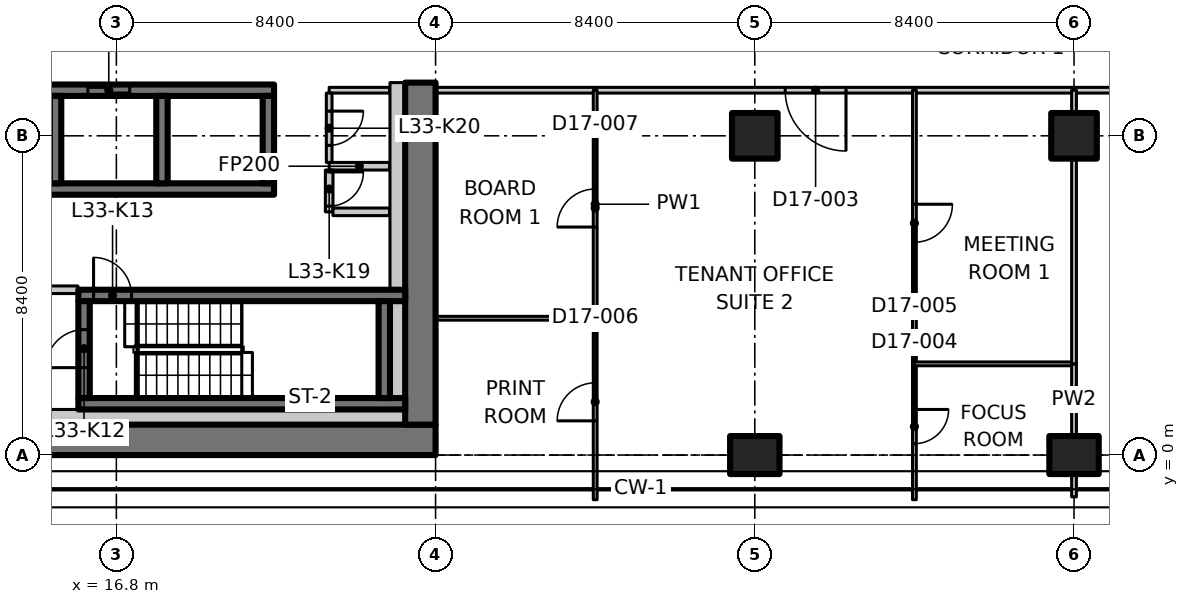
"""IFC4 building model, lengths in metres.
Left out: names, types, materials, properties, quantities, classifications, styles, units other than length and angle.
Written with IfcOpenShell. Run it as: python <this file> out.ifc"""

import sys

from ifc_helpers import new_model, si_unit, direction, frame, frame_2d, origin, origin_2d, place, context, subcontext, project, spatial, polyline, rectangle, outline, extrude, element, fill, save


model = new_model("IFC4")
c1 = context("Model", 3, precision=1e-05, world=origin(), true_north=direction((0.0, 1.0)))
c2 = subcontext(c1, "Body", "Model", "MODEL_VIEW")
j1 = project(units=[si_unit("LENGTHUNIT", "METRE"), si_unit("PLANEANGLEUNIT", "RADIAN")], contexts=[c1])
p1 = place(None, origin())
s1 = spatial("IfcSite", under=j1, at=p1, CompositionType="ELEMENT")
p2 = place(p1, origin())
s2 = spatial("IfcBuilding", under=s1, at=p2, CompositionType="ELEMENT")
p3 = place(p2, frame((0.0, 0.0, 134.9)))
s3 = spatial("IfcBuildingStorey", under=s2, at=p3, CompositionType="ELEMENT", Elevation=134.9)
p4 = place(p3, frame((33.6, 0.0, 0.0), z_axis=(0.0, 0.0, 1.0), x_axis=(0.0, 1.0, 0.0)))
e1 = element("IfcColumn", 1, at=p4, inside=s3, PredefinedType="COLUMN", context=c2, shape_type="SweptSolid", body=[
    extrude(rectangle(XDim=1.0, YDim=1.3, at=origin_2d()), origin(), (0.0, 0.0, 1.0), 3.35),
])
p5 = place(p3, frame((33.6, 8.4, 0.0), z_axis=(0.0, 0.0, 1.0), x_axis=(1.0, 0.0, 0.0)))
e2 = element("IfcColumn", 2, at=p5, inside=s3, PredefinedType="COLUMN", context=c2, shape_type="SweptSolid", body=[
    extrude(rectangle(XDim=1.2, YDim=1.2, at=origin_2d()), origin(), (0.0, 0.0, 1.0), 3.35),
])
p6 = place(p3, frame((42.0, 0.0, 0.0), z_axis=(0.0, 0.0, 1.0), x_axis=(0.0, 1.0, 0.0)))
e3 = element("IfcColumn", 3, at=p6, inside=s3, PredefinedType="COLUMN", context=c2, shape_type="SweptSolid", body=[
    extrude(rectangle(XDim=1.0, YDim=1.3, at=origin_2d()), origin(), (0.0, 0.0, 1.0), 3.35),
])
p7 = place(p3, frame((42.0, 8.4, 0.0), z_axis=(0.0, 0.0, 1.0), x_axis=(1.0, 0.0, 0.0)))
e4 = element("IfcColumn", 4, at=p7, inside=s3, PredefinedType="COLUMN", context=c2, shape_type="SweptSolid", body=[
    extrude(rectangle(XDim=1.2, YDim=1.2, at=origin_2d()), origin(), (0.0, 0.0, 1.0), 3.35),
])
p8 = place(p3, frame((7.136, 0.4, 0.0), z_axis=(0.0, 0.0, 1.0), x_axis=(1.0, 0.0, 0.0)))
e5 = element("IfcWall", 5, at=p8, inside=s3, PredefinedType="SHEAR", context=c2, shape_type="SweptSolid", body=[
    extrude(rectangle(XDim=18.063, YDim=0.8, at=frame_2d((9.032, 0.0))), origin(), (0.0, 0.0, 1.0), 3.35),
])
p9 = place(p3, frame((24.8, 0.8, 0.0), z_axis=(0.0, 0.0, 1.0), x_axis=(0.0, 1.0, 0.0)))
e6 = element("IfcWall", 6, at=p9, inside=s3, PredefinedType="SHEAR", context=c2, shape_type="SweptSolid", body=[
    extrude(rectangle(XDim=9.0, YDim=0.8, at=frame_2d((4.5, 0.0))), origin(), (0.0, 0.0, 1.0), 3.35),
])
p10 = place(p3, frame((0.8, 7.0, 0.0), z_axis=(0.0, 0.0, 1.0), x_axis=(1.0, 0.0, 0.0)))
e7 = element("IfcWall", 7, at=p10, inside=s3, PredefinedType="SHEAR", context=c2, shape_type="SweptSolid", body=[
    extrude(rectangle(XDim=20.15, YDim=0.3, at=frame_2d((10.075, 0.0))), origin(), (0.0, 0.0, 1.0), 3.35),
])
p11 = place(p3, frame((0.8, 9.6, 0.0), z_axis=(0.0, 0.0, 1.0), x_axis=(1.0, 0.0, 0.0)))
e8 = element("IfcWall", 8, at=p11, inside=s3, PredefinedType="SHEAR", context=c2, shape_type="SweptSolid", body=[
    extrude(rectangle(XDim=20.15, YDim=0.3, at=frame_2d((10.075, 0.0))), origin(), (0.0, 0.0, 1.0), 3.35),
])
p12 = place(p11, frame((1.25, 0.0, 0.0)))
e9 = element("IfcOpeningElement", 9, at=p12, cuts=e8, PredefinedType="OPENING", context=c2, shape_type="SweptSolid", body=[
    extrude(rectangle(XDim=1.1, YDim=2.3, at=frame_2d((0.55, 1.15))), frame((0.0, 0.16, 0.0), z_axis=(0.0, -1.0, 0.0), x_axis=(1.0, 0.0, 0.0)), (0.0, 0.0, 1.0), 0.32),
])
p13 = place(p11, frame((4.05, 0.0, 0.0)))
e10 = element("IfcOpeningElement", 10, at=p13, cuts=e8, PredefinedType="OPENING", context=c2, shape_type="SweptSolid", body=[
    extrude(rectangle(XDim=1.1, YDim=2.3, at=frame_2d((0.55, 1.15))), frame((0.0, 0.16, 0.0), z_axis=(0.0, -1.0, 0.0), x_axis=(1.0, 0.0, 0.0)), (0.0, 0.0, 1.0), 0.32),
])
p14 = place(p11, frame((6.85, 0.0, 0.0)))
e11 = element("IfcOpeningElement", 11, at=p14, cuts=e8, PredefinedType="OPENING", context=c2, shape_type="SweptSolid", body=[
    extrude(rectangle(XDim=1.1, YDim=2.3, at=frame_2d((0.55, 1.15))), frame((0.0, 0.16, 0.0), z_axis=(0.0, -1.0, 0.0), x_axis=(1.0, 0.0, 0.0)), (0.0, 0.0, 1.0), 0.32),
])
p15 = place(p11, frame((9.65, 0.0, 0.0)))
e12 = element("IfcOpeningElement", 12, at=p15, cuts=e8, PredefinedType="OPENING", context=c2, shape_type="SweptSolid", body=[
    extrude(rectangle(XDim=1.1, YDim=2.3, at=frame_2d((0.55, 1.15))), frame((0.0, 0.16, 0.0), z_axis=(0.0, -1.0, 0.0), x_axis=(1.0, 0.0, 0.0)), (0.0, 0.0, 1.0), 0.32),
])
p16 = place(p11, frame((12.45, 0.0, 0.0)))
e13 = element("IfcOpeningElement", 13, at=p16, cuts=e8, PredefinedType="OPENING", context=c2, shape_type="SweptSolid", body=[
    extrude(rectangle(XDim=1.1, YDim=2.3, at=frame_2d((0.55, 1.15))), frame((0.0, 0.16, 0.0), z_axis=(0.0, -1.0, 0.0), x_axis=(1.0, 0.0, 0.0)), (0.0, 0.0, 1.0), 0.32),
])
p17 = place(p11, frame((15.25, 0.0, 0.0)))
e14 = element("IfcOpeningElement", 14, at=p17, cuts=e8, PredefinedType="OPENING", context=c2, shape_type="SweptSolid", body=[
    extrude(rectangle(XDim=1.1, YDim=2.3, at=frame_2d((0.55, 1.15))), frame((0.0, 0.16, 0.0), z_axis=(0.0, -1.0, 0.0), x_axis=(1.0, 0.0, 0.0)), (0.0, 0.0, 1.0), 0.32),
])
for number, where, z_axis, x_axis in (
    (15, (15.2, 7.15, 0.0), (0.0, 0.0, 1.0), (0.0, 1.0, 0.0)),
    (16, (18.0, 7.15, 0.0), (0.0, 0.0, 1.0), (0.0, 1.0, 0.0)),
    (17, (20.8, 7.15, 0.0), (0.0, 0.0, 1.0), (0.0, 1.0, 0.0)),
):
    element("IfcWall", number, at=place(p3, frame(where, z_axis=z_axis, x_axis=x_axis)), inside=s3, PredefinedType="SHEAR", context=c2, shape_type="SweptSolid", body=[
        extrude(rectangle(XDim=2.3, YDim=0.3, at=frame_2d((1.15, 0.0))), origin(), (0.0, 0.0, 1.0), 3.35),
    ])
p18 = place(p3, frame((15.8, 1.35, 0.0), z_axis=(0.0, 0.0, 1.0), x_axis=(1.0, 0.0, 0.0)))
e18 = element("IfcWall", 18, at=p18, inside=s3, PredefinedType="SHEAR", context=c2, shape_type="SweptSolid", body=[
    extrude(rectangle(XDim=8.6, YDim=0.3, at=frame_2d((4.3, 0.0))), origin(), (0.0, 0.0, 1.0), 3.35),
])
p19 = place(p3, frame((15.8, 4.2, 0.0), z_axis=(0.0, 0.0, 1.0), x_axis=(1.0, 0.0, 0.0)))
e19 = element("IfcWall", 19, at=p19, inside=s3, PredefinedType="SHEAR", context=c2, shape_type="SweptSolid", body=[
    extrude(rectangle(XDim=8.6, YDim=0.3, at=frame_2d((4.3, 0.0))), origin(), (0.0, 0.0, 1.0), 3.35),
])
p20 = place(p19, frame((0.4, 0.0, 0.0)))
e20 = element("IfcOpeningElement", 20, at=p20, cuts=e19, PredefinedType="OPENING", context=c2, shape_type="SweptSolid", body=[
    extrude(rectangle(XDim=1.0, YDim=2.1, at=frame_2d((0.5, 1.05))), frame((0.0, 0.16, 0.0), z_axis=(0.0, -1.0, 0.0), x_axis=(1.0, 0.0, 0.0)), (0.0, 0.0, 1.0), 0.32),
])
p21 = place(p3, frame((15.95, 1.5, 0.0), z_axis=(0.0, 0.0, 1.0), x_axis=(0.0, 1.0, 0.0)))
e21 = element("IfcWall", 21, at=p21, inside=s3, PredefinedType="SHEAR", context=c2, shape_type="SweptSolid", body=[
    extrude(rectangle(XDim=2.55, YDim=0.3, at=frame_2d((1.275, 0.0))), origin(), (0.0, 0.0, 1.0), 3.35),
])
p22 = place(p21, frame((0.8, 0.0, 0.0)))
e22 = element("IfcOpeningElement", 22, at=p22, cuts=e21, PredefinedType="OPENING", context=c2, shape_type="SweptSolid", body=[
    extrude(rectangle(XDim=1.0, YDim=2.1, at=frame_2d((0.5, 1.05))), frame((0.0, 0.16, 0.0), z_axis=(0.0, -1.0, 0.0), x_axis=(1.0, 0.0, 0.0)), (0.0, 0.0, 1.0), 0.32),
])
p23 = place(p3, frame((23.85, 1.5, 0.0), z_axis=(0.0, 0.0, 1.0), x_axis=(0.0, 1.0, 0.0)))
e23 = element("IfcWall", 23, at=p23, inside=s3, PredefinedType="SHEAR", context=c2, shape_type="SweptSolid", body=[
    extrude(rectangle(XDim=2.55, YDim=0.3, at=frame_2d((1.275, 0.0))), origin(), (0.0, 0.0, 1.0), 3.35),
])
p24 = place(p3, frame((13.362, 4.35, 0.0), z_axis=(0.0, 0.0, 1.0), x_axis=(1.0, 0.0, 0.0)))
e24 = element("IfcWall", 24, at=p24, inside=s3, PredefinedType="PARTITIONING", context=c2, shape_type="SweptSolid", body=[
    extrude(rectangle(XDim=2.426, YDim=0.2, at=frame_2d((1.213, 0.0))), origin(), (0.0, 0.0, 1.0), 3.35),
])
p25 = place(p24, frame((0.638, 0.0, 0.0)))
e25 = element("IfcOpeningElement", 25, at=p25, cuts=e24, PredefinedType="OPENING", context=c2, shape_type="SweptSolid", body=[
    extrude(rectangle(XDim=1.0, YDim=2.1, at=frame_2d((0.5, 1.05))), frame((0.0, 0.11, 0.0), z_axis=(0.0, -1.0, 0.0), x_axis=(1.0, 0.0, 0.0)), (0.0, 0.0, 1.0), 0.22),
])
p26 = place(p3, frame((23.988, 7.6, 0.0), z_axis=(0.0, 0.0, 1.0), x_axis=(-1.0, 0.0, 0.0)))
e26 = element("IfcWall", 26, at=p26, inside=s3, PredefinedType="PARTITIONING", context=c2, shape_type="SweptSolid", body=[
    extrude(rectangle(XDim=1.588, YDim=0.2, at=frame_2d((0.794, 0.0))), origin(), (0.0, 0.0, 1.0), 3.35),
])
p27 = place(p3, frame((22.4, 7.5, 0.0), z_axis=(0.0, 0.0, 1.0), x_axis=(0.0, -1.0, 0.0)))
e27 = element("IfcWall", 27, at=p27, inside=s3, PredefinedType="PARTITIONING", context=c2, shape_type="SweptSolid", body=[
    extrude(rectangle(XDim=1.1, YDim=0.2, at=frame_2d((0.55, 0.0))), origin(), (0.0, 0.0, 1.0), 3.35),
])
p28 = place(p27, frame((0.05, 0.0, 0.0)))
e28 = element("IfcOpeningElement", 28, at=p28, cuts=e27, PredefinedType="OPENING", context=c2, shape_type="SweptSolid", body=[
    extrude(rectangle(XDim=0.9, YDim=2.1, at=frame_2d((0.45, 1.05))), frame((0.0, 0.11, 0.0), z_axis=(0.0, -1.0, 0.0), x_axis=(1.0, 0.0, 0.0)), (0.0, 0.0, 1.0), 0.22),
])
p29 = place(p3, frame((22.5, 6.4, 0.0), z_axis=(0.0, 0.0, 1.0), x_axis=(1.0, 0.0, 0.0)))
e29 = element("IfcWall", 29, at=p29, inside=s3, PredefinedType="PARTITIONING", context=c2, shape_type="SweptSolid", body=[
    extrude(rectangle(XDim=1.488, YDim=0.2, at=frame_2d((0.744, 0.0))), origin(), (0.0, 0.0, 1.0), 3.35),
])
p30 = place(p3, frame((23.988, 9.6, 0.0), z_axis=(0.0, 0.0, 1.0), x_axis=(-1.0, 0.0, 0.0)))
e30 = element("IfcWall", 30, at=p30, inside=s3, PredefinedType="PARTITIONING", context=c2, shape_type="SweptSolid", body=[
    extrude(rectangle(XDim=1.588, YDim=0.15, at=frame_2d((0.794, 0.0))), origin(), (0.0, 0.0, 1.0), 3.35),
])
p31 = place(p3, frame((22.4, 9.525, 0.0), z_axis=(0.0, 0.0, 1.0), x_axis=(0.0, -1.0, 0.0)))
e31 = element("IfcWall", 31, at=p31, inside=s3, PredefinedType="PARTITIONING", context=c2, shape_type="SweptSolid", body=[
    extrude(rectangle(XDim=1.825, YDim=0.15, at=frame_2d((0.913, 0.0))), origin(), (0.0, 0.0, 1.0), 3.35),
])
p32 = place(p31, frame((0.475, 0.0, 0.0)))
e32 = element("IfcOpeningElement", 32, at=p32, cuts=e31, PredefinedType="OPENING", context=c2, shape_type="SweptSolid", body=[
    extrude(rectangle(XDim=0.9, YDim=2.1, at=frame_2d((0.45, 1.05))), frame((0.0, 0.085, 0.0), z_axis=(0.0, -1.0, 0.0), x_axis=(1.0, 0.0, 0.0)), (0.0, 0.0, 1.0), 0.17),
])
p33 = place(p3, frame((13.35, 1.0, 0.0), z_axis=(0.0, 0.0, 1.0), x_axis=(1.0, 0.0, 0.0)))
e33 = element("IfcWall", 33, at=p33, inside=s3, PredefinedType="PARTITIONING", context=c2, shape_type="SweptSolid", body=[
    extrude(rectangle(XDim=11.05, YDim=0.4, at=frame_2d((5.525, 0.0))), origin(), (0.0, 0.0, 1.0), 3.35),
])
p34 = place(p3, frame((24.2, 1.5, 0.0), z_axis=(0.0, 0.0, 1.0), x_axis=(0.0, 1.0, 0.0)))
e34 = element("IfcWall", 34, at=p34, inside=s3, PredefinedType="PARTITIONING", context=c2, shape_type="SweptSolid", body=[
    extrude(rectangle(XDim=2.55, YDim=0.4, at=frame_2d((1.275, 0.0))), origin(), (0.0, 0.0, 1.0), 3.35),
])
p35 = place(p3, frame((24.2, 4.35, 0.0), z_axis=(0.0, 0.0, 1.0), x_axis=(0.0, 1.0, 0.0)))
e35 = element("IfcWall", 35, at=p35, inside=s3, PredefinedType="PARTITIONING", context=c2, shape_type="SweptSolid", body=[
    extrude(rectangle(XDim=5.45, YDim=0.4, at=frame_2d((2.725, 0.0))), origin(), (0.0, 0.0, 1.0), 3.35),
])
p36 = place(p3, frame((29.4, 9.6, 0.0), z_axis=(0.0, 0.0, 1.0), x_axis=(-1.0, 0.0, 0.0)))
e36 = element("IfcWall", 36, at=p36, inside=s3, PredefinedType="PARTITIONING", context=c2, shape_type="SweptSolid", body=[
    extrude(rectangle(XDim=4.2, YDim=0.15, at=frame_2d((2.1, 0.0))), origin(), (0.0, 0.0, 1.0), 3.33),
])
p37 = place(p3, frame((37.8, 9.6, 0.0), z_axis=(0.0, 0.0, 1.0), x_axis=(-1.0, 0.0, 0.0)))
e37 = element("IfcWall", 37, at=p37, inside=s3, PredefinedType="PARTITIONING", context=c2, shape_type="SweptSolid", body=[
    extrude(rectangle(XDim=8.4, YDim=0.15, at=frame_2d((4.2, 0.0))), origin(), (0.0, 0.0, 1.0), 3.33),
])
p38 = place(p37, frame((1.8, 0.0, 0.0)))
e38 = element("IfcOpeningElement", 38, at=p38, cuts=e37, PredefinedType="OPENING", context=c2, shape_type="SweptSolid", body=[
    extrude(rectangle(XDim=1.6, YDim=2.1, at=frame_2d((0.8, 1.05))), frame((0.0, 0.085, 0.0), z_axis=(0.0, -1.0, 0.0), x_axis=(1.0, 0.0, 0.0)), (0.0, 0.0, 1.0), 0.17),
])
p39 = place(p3, frame((42.0, 9.6, 0.0), z_axis=(0.0, 0.0, 1.0), x_axis=(-1.0, 0.0, 0.0)))
e39 = element("IfcWall", 39, at=p39, inside=s3, PredefinedType="PARTITIONING", context=c2, shape_type="SweptSolid", body=[
    extrude(rectangle(XDim=4.2, YDim=0.15, at=frame_2d((2.1, 0.0))), origin(), (0.0, 0.0, 1.0), 3.33),
])
p40 = place(p3, frame((50.4, 9.6, 0.0), z_axis=(0.0, 0.0, 1.0), x_axis=(-1.0, 0.0, 0.0)))
e40 = element("IfcWall", 40, at=p40, inside=s3, PredefinedType="PARTITIONING", context=c2, shape_type="SweptSolid", body=[
    extrude(rectangle(XDim=8.4, YDim=0.15, at=frame_2d((4.2, 0.0))), origin(), (0.0, 0.0, 1.0), 3.33),
])
p41 = place(p40, frame((3.3, 0.0, 0.0)))
e41 = element("IfcOpeningElement", 41, at=p41, cuts=e40, PredefinedType="OPENING", context=c2, shape_type="SweptSolid", body=[
    extrude(rectangle(XDim=1.6, YDim=2.1, at=frame_2d((0.8, 1.05))), frame((0.0, 0.085, 0.0), z_axis=(0.0, -1.0, 0.0), x_axis=(1.0, 0.0, 0.0)), (0.0, 0.0, 1.0), 0.17),
])
p42 = place(p3, frame((37.8, 2.4, 0.0), z_axis=(0.0, 0.0, 1.0), x_axis=(0.0, -1.0, 0.0)))
e42 = element("IfcWall", 42, at=p42, inside=s3, PredefinedType="PARTITIONING", context=c2, shape_type="SweptSolid", body=[
    extrude(rectangle(XDim=3.574, YDim=0.1, at=frame_2d((1.787, 0.0))), origin(), (0.0, 0.0, 1.0), 2.98),
])
p43 = place(p42, frame((1.2, 0.0, 0.0)))
e43 = element("IfcOpeningElement", 43, at=p43, cuts=e42, PredefinedType="OPENING", context=c2, shape_type="SweptSolid", body=[
    extrude(rectangle(XDim=0.9, YDim=2.1, at=frame_2d((0.45, 1.05))), frame((0.0, 0.06, 0.0), z_axis=(0.0, -1.0, 0.0), x_axis=(1.0, 0.0, 0.0)), (0.0, 0.0, 1.0), 0.12),
])
p44 = place(p3, frame((37.8, 9.6, 0.0), z_axis=(0.0, 0.0, 1.0), x_axis=(0.0, -1.0, 0.0)))
e44 = element("IfcWall", 44, at=p44, inside=s3, PredefinedType="PARTITIONING", context=c2, shape_type="SweptSolid", body=[
    extrude(rectangle(XDim=7.2, YDim=0.1, at=frame_2d((3.6, 0.0))), origin(), (0.0, 0.0, 1.0), 3.33),
])
p45 = place(p44, frame((3.0, 0.0, 0.0)))
e45 = element("IfcOpeningElement", 45, at=p45, cuts=e44, PredefinedType="OPENING", context=c2, shape_type="SweptSolid", body=[
    extrude(rectangle(XDim=1.0, YDim=2.1, at=frame_2d((0.5, 1.05))), frame((0.0, 0.06, 0.0), z_axis=(0.0, -1.0, 0.0), x_axis=(1.0, 0.0, 0.0)), (0.0, 0.0, 1.0), 0.12),
])
p46 = place(p3, frame((29.4, -1.174, 0.0), z_axis=(0.0, 0.0, 1.0), x_axis=(0.0, 1.0, 0.0)))
e46 = element("IfcWall", 46, at=p46, inside=s3, PredefinedType="PARTITIONING", context=c2, shape_type="SweptSolid", body=[
    extrude(outline(polyline([(0.0, 0.0), (4.774, 0.0), (4.774, 3.33), (1.624, 3.33), (1.622, 2.98), (0.726, 2.98), (0.724, 3.33), (0.074, 3.33), (0.0, 3.33), (0.0, 0.0)])), frame((0.0, 0.05, 0.0), z_axis=(0.0, -1.0, 0.0), x_axis=(1.0, 0.0, 0.0)), (0.0, 0.0, 1.0), 0.1),
])
p47 = place(p46, frame((2.074, 0.0, 0.0)))
e47 = element("IfcOpeningElement", 47, at=p47, cuts=e46, PredefinedType="OPENING", context=c2, shape_type="SweptSolid", body=[
    extrude(rectangle(XDim=1.0, YDim=2.1, at=frame_2d((0.5, 1.05))), frame((0.0, 0.06, 0.0), z_axis=(0.0, -1.0, 0.0), x_axis=(1.0, 0.0, 0.0)), (0.0, 0.0, 1.0), 0.12),
])
p48 = place(p3, frame((29.4, 3.6, 0.0), z_axis=(0.0, 0.0, 1.0), x_axis=(0.0, 1.0, 0.0)))
e48 = element("IfcWall", 48, at=p48, inside=s3, PredefinedType="PARTITIONING", context=c2, shape_type="SweptSolid", body=[
    extrude(rectangle(XDim=6.0, YDim=0.1, at=frame_2d((3.0, 0.0))), origin(), (0.0, 0.0, 1.0), 3.33),
])
p49 = place(p48, frame((2.4, 0.0, 0.0)))
e49 = element("IfcOpeningElement", 49, at=p49, cuts=e48, PredefinedType="OPENING", context=c2, shape_type="SweptSolid", body=[
    extrude(rectangle(XDim=1.0, YDim=2.1, at=frame_2d((0.5, 1.05))), frame((0.0, 0.06, 0.0), z_axis=(0.0, -1.0, 0.0), x_axis=(1.0, 0.0, 0.0)), (0.0, 0.0, 1.0), 0.12),
])
p50 = place(p3, frame((37.8, 2.4, 0.0), z_axis=(0.0, 0.0, 1.0), x_axis=(1.0, 0.0, 0.0)))
e50 = element("IfcWall", 50, at=p50, inside=s3, PredefinedType="PARTITIONING", context=c2, shape_type="SweptSolid", body=[
    extrude(rectangle(XDim=4.2, YDim=0.1, at=frame_2d((2.1, 0.0))), origin(), (0.0, 0.0, 1.0), 3.33),
])
p51 = place(p3, frame((42.0, 2.4, 0.0), z_axis=(0.0, 0.0, 1.0), x_axis=(0.0, -1.0, 0.0)))
e51 = element("IfcWall", 51, at=p51, inside=s3, PredefinedType="PARTITIONING", context=c2, shape_type="SweptSolid", body=[
    extrude(rectangle(XDim=1.88, YDim=0.125, at=frame_2d((0.94, 0.0))), origin(), (0.0, 0.0, 1.0), 3.33),
])
for number, where, z_axis, x_axis in (
    (52, (42.0, -0.52, 0.0), (0.0, 0.0, 1.0), (0.0, -1.0, 0.0)),
    (53, (42.0, 9.6, 0.0), (0.0, 0.0, 1.0), (0.0, -1.0, 0.0)),
):
    element("IfcWall", number, at=place(p3, frame(where, z_axis=z_axis, x_axis=x_axis)), inside=s3, PredefinedType="PARTITIONING", context=c2, shape_type="SweptSolid", body=[
        extrude(rectangle(XDim=0.58, YDim=0.125, at=frame_2d((0.29, 0.0))), origin(), (0.0, 0.0, 1.0), 3.33),
    ])
p52 = place(p3, frame((42.0, 7.78, 0.0), z_axis=(0.0, 0.0, 1.0), x_axis=(0.0, -1.0, 0.0)))
e54 = element("IfcWall", 54, at=p52, inside=s3, PredefinedType="PARTITIONING", context=c2, shape_type="SweptSolid", body=[
    extrude(rectangle(XDim=5.38, YDim=0.125, at=frame_2d((2.69, 0.0))), origin(), (0.0, 0.0, 1.0), 3.33),
])
p53 = place(p3, frame((25.2, 3.6, 0.0), z_axis=(0.0, 0.0, 1.0), x_axis=(1.0, 0.0, 0.0)))
e55 = element("IfcWall", 55, at=p53, inside=s3, PredefinedType="PARTITIONING", context=c2, shape_type="SweptSolid", body=[
    extrude(rectangle(XDim=4.2, YDim=0.1, at=frame_2d((2.1, 0.0))), origin(), (0.0, 0.0, 1.0), 3.33),
])
p54 = place(p17, origin())
e56 = element("IfcDoor", 56, at=p54, inside=s3, OperationType="SLIDING_TO_LEFT", PredefinedType="DOOR", context=c2, shape_type="SweptSolid", body=[
    extrude(rectangle(XDim=1.1, YDim=2.3, at=frame_2d((0.55, 1.15))), frame((0.0, 0.025, 0.0), z_axis=(0.0, -1.0, 0.0), x_axis=(1.0, 0.0, 0.0)), (0.0, 0.0, 1.0), 0.05),
])
fill(e14, e56)
p55 = place(p22, origin())
e57 = element("IfcDoor", 57, at=p55, inside=s3, OperationType="SINGLE_SWING_RIGHT", PredefinedType="DOOR", context=c2, shape_type="SweptSolid", body=[
    extrude(rectangle(XDim=1.0, YDim=2.1, at=frame_2d((0.5, 1.05))), frame((0.0, 0.025, 0.0), z_axis=(0.0, -1.0, 0.0), x_axis=(1.0, 0.0, 0.0)), (0.0, 0.0, 1.0), 0.05),
])
fill(e22, e57)
p56 = place(p20, origin())
e58 = element("IfcDoor", 58, at=p56, inside=s3, OperationType="SINGLE_SWING_LEFT", PredefinedType="DOOR", context=c2, shape_type="SweptSolid", body=[
    extrude(rectangle(XDim=1.0, YDim=2.1, at=frame_2d((0.5, 1.05))), frame((0.0, 0.025, 0.0), z_axis=(0.0, -1.0, 0.0), x_axis=(1.0, 0.0, 0.0)), (0.0, 0.0, 1.0), 0.05),
])
fill(e20, e58)
p57 = place(p28, origin())
e59 = element("IfcDoor", 59, at=p57, inside=s3, OperationType="SINGLE_SWING_LEFT", PredefinedType="DOOR", context=c2, shape_type="SweptSolid", body=[
    extrude(rectangle(XDim=0.9, YDim=2.1, at=frame_2d((0.45, 1.05))), frame((0.0, 0.025, 0.0), z_axis=(0.0, -1.0, 0.0), x_axis=(1.0, 0.0, 0.0)), (0.0, 0.0, 1.0), 0.05),
])
fill(e28, e59)
p58 = place(p32, origin())
e60 = element("IfcDoor", 60, at=p58, inside=s3, OperationType="SINGLE_SWING_RIGHT", PredefinedType="DOOR", context=c2, shape_type="SweptSolid", body=[
    extrude(rectangle(XDim=0.9, YDim=2.1, at=frame_2d((0.45, 1.05))), frame((0.0, 0.025, 0.0), z_axis=(0.0, -1.0, 0.0), x_axis=(1.0, 0.0, 0.0)), (0.0, 0.0, 1.0), 0.05),
])
fill(e32, e60)
p59 = place(p38, origin())
e61 = element("IfcDoor", 61, at=p59, inside=s3, OperationType="DOUBLE_DOOR_SINGLE_SWING", PredefinedType="DOOR", context=c2, shape_type="SweptSolid", body=[
    extrude(rectangle(XDim=1.6, YDim=2.1, at=frame_2d((0.8, 1.05))), frame((0.0, 0.025, 0.0), z_axis=(0.0, -1.0, 0.0), x_axis=(1.0, 0.0, 0.0)), (0.0, 0.0, 1.0), 0.05),
])
fill(e38, e61)
p60 = place(p43, origin())
e62 = element("IfcDoor", 62, at=p60, inside=s3, OperationType="SINGLE_SWING_LEFT", PredefinedType="DOOR", context=c2, shape_type="SweptSolid", body=[
    extrude(rectangle(XDim=0.9, YDim=2.1, at=frame_2d((0.45, 1.05))), frame((0.0, 0.025, 0.0), z_axis=(0.0, -1.0, 0.0), x_axis=(1.0, 0.0, 0.0)), (0.0, 0.0, 1.0), 0.05),
])
fill(e43, e62)
p61 = place(p45, origin())
e63 = element("IfcDoor", 63, at=p61, inside=s3, OperationType="SINGLE_SWING_LEFT", PredefinedType="DOOR", context=c2, shape_type="SweptSolid", body=[
    extrude(rectangle(XDim=1.0, YDim=2.1, at=frame_2d((0.5, 1.05))), frame((0.0, 0.025, 0.0), z_axis=(0.0, -1.0, 0.0), x_axis=(1.0, 0.0, 0.0)), (0.0, 0.0, 1.0), 0.05),
])
fill(e45, e63)
p62 = place(p47, origin())
e64 = element("IfcDoor", 64, at=p62, inside=s3, OperationType="SINGLE_SWING_LEFT", PredefinedType="DOOR", context=c2, shape_type="SweptSolid", body=[
    extrude(rectangle(XDim=1.0, YDim=2.1, at=frame_2d((0.5, 1.05))), frame((0.0, 0.025, 0.0), z_axis=(0.0, -1.0, 0.0), x_axis=(1.0, 0.0, 0.0)), (0.0, 0.0, 1.0), 0.05),
])
fill(e47, e64)
p63 = place(p49, origin())
e65 = element("IfcDoor", 65, at=p63, inside=s3, OperationType="SINGLE_SWING_LEFT", PredefinedType="DOOR", context=c2, shape_type="SweptSolid", body=[
    extrude(rectangle(XDim=1.0, YDim=2.1, at=frame_2d((0.5, 1.05))), frame((0.0, 0.025, 0.0), z_axis=(0.0, -1.0, 0.0), x_axis=(1.0, 0.0, 0.0)), (0.0, 0.0, 1.0), 0.05),
])
fill(e49, e65)
save(model, sys.argv[1])
